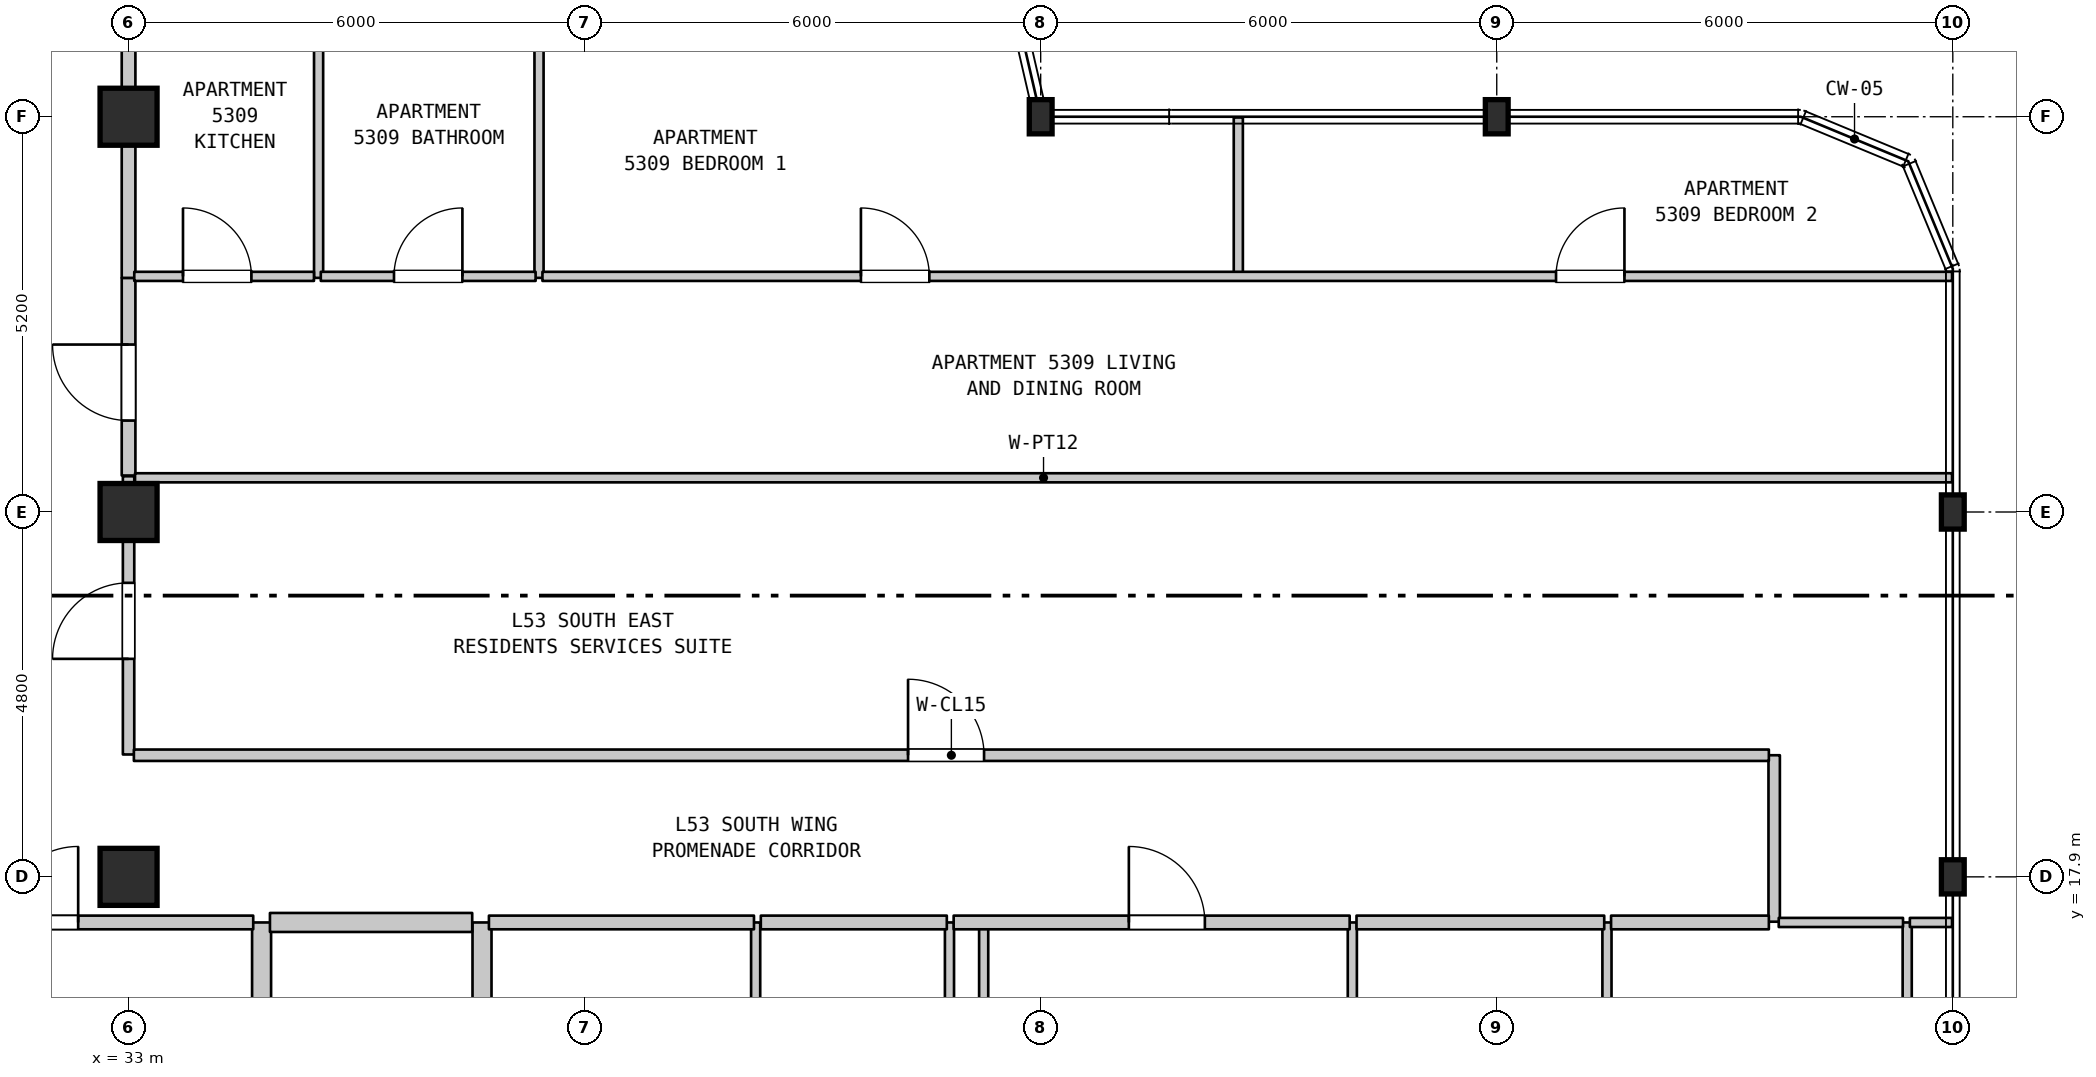
"""IFC4 building model, lengths in metres.
Left out: names, types, materials, properties, quantities, classifications, styles, units other than length and angle.
Written with IfcOpenShell. Run it as: python <this file> out.ifc"""

import sys

from ifc_helpers import new_model, si_unit, direction, frame, frame_2d, origin, origin_2d, place, context, subcontext, project, spatial, rectangle, i_section, extrude, element, fill, save


model = new_model("IFC4")
c1 = context("Model", 3, precision=1e-05, world=origin(), true_north=direction((0.0, 1.0)))
c2 = subcontext(c1, "Body", "Model", "MODEL_VIEW")
j1 = project(units=[si_unit("LENGTHUNIT", "METRE"), si_unit("PLANEANGLEUNIT", "RADIAN")], contexts=[c1])
p1 = place(None, origin())
s1 = spatial("IfcSite", under=j1, at=p1, CompositionType="ELEMENT")
p2 = place(p1, origin())
s2 = spatial("IfcBuilding", under=s1, at=p2, CompositionType="ELEMENT")
p3 = place(p2, frame((0.0, 0.0, 214.3)))
s3 = spatial("IfcBuildingStorey", under=s2, at=p3, CompositionType="ELEMENT", Elevation=214.3)
for number, where, z_axis, x_axis in (
    (1, (33.0, 17.9, 0.0), (0.0, 0.0, 1.0), (1.0, 0.0, 0.0)),
    (2, (33.0, 22.7, 0.0), (0.0, 0.0, 1.0), (1.0, 0.0, 0.0)),
    (3, (33.0, 27.9, 0.0), (0.0, 0.0, 1.0), (1.0, 0.0, 0.0)),
):
    element("IfcColumn", number, at=place(p3, frame(where, z_axis=z_axis, x_axis=x_axis)), inside=s3, PredefinedType="COLUMN", context=c2, shape_type="SweptSolid", body=[
        extrude(rectangle(XDim=0.75, YDim=0.75, at=origin_2d()), origin(), (0.0, 0.0, 1.0), 3.7),
    ])
for number, where, z_axis, x_axis in (
    (4, (45.0, 27.9, 0.0), (0.0, 0.0, 1.0), (1.0, 0.0, 0.0)),
    (5, (51.0, 27.9, 0.0), (0.0, 0.0, 1.0), (1.0, 0.0, 0.0)),
    (6, (57.0, 17.9, 0.0), (0.0, 0.0, 1.0), (1.0, 0.0, 0.0)),
    (7, (57.0, 22.7, 0.0), (0.0, 0.0, 1.0), (1.0, 0.0, 0.0)),
):
    element("IfcColumn", number, at=place(p3, frame(where, z_axis=z_axis, x_axis=x_axis)), inside=s3, PredefinedType="COLUMN", context=c2, shape_type="SweptSolid", body=[
        extrude(i_section(OverallWidth=0.3, OverallDepth=0.45, WebThickness=0.014, FlangeThickness=0.026, FilletRadius=0.027, at=origin_2d()), origin(), (0.0, 0.0, 1.0), 3.7),
    ])
p4 = place(p3, frame((33.0, 19.51, 0.0), z_axis=(0.0, 0.0, 1.0), x_axis=(0.0, 1.0, 0.0)))
e8 = element("IfcWall", 8, at=p4, inside=s3, PredefinedType="STANDARD", context=c2, shape_type="SweptSolid", body=[
    extrude(rectangle(XDim=3.66, YDim=0.15, at=frame_2d((1.83, 0.0))), origin(), (0.0, 0.0, 1.0), 2.98),
])
p5 = place(p4, frame((1.258, 0.0, 0.0)))
e9 = element("IfcOpeningElement", 9, at=p5, cuts=e8, PredefinedType="OPENING", context=c2, shape_type="SweptSolid", body=[
    extrude(rectangle(XDim=1.0, YDim=2.15, at=frame_2d((0.5, 1.075))), frame((0.0, 0.085, 0.0), z_axis=(0.0, -1.0, 0.0), x_axis=(1.0, 0.0, 0.0)), (0.0, 0.0, 1.0), 0.17),
])
p6 = place(p3, frame((33.0, 23.18, 0.0), z_axis=(0.0, 0.0, 1.0), x_axis=(0.0, 1.0, 0.0)))
e10 = element("IfcWall", 10, at=p6, inside=s3, PredefinedType="STANDARD", context=c2, shape_type="SweptSolid", body=[
    extrude(rectangle(XDim=2.6, YDim=0.18, at=frame_2d((1.3, 0.0))), origin(), (0.0, 0.0, 1.0), 2.98),
])
p7 = place(p6, frame((0.723, 0.0, 0.0)))
e11 = element("IfcOpeningElement", 11, at=p7, cuts=e10, PredefinedType="OPENING", context=c2, shape_type="SweptSolid", body=[
    extrude(rectangle(XDim=1.0, YDim=2.15, at=frame_2d((0.5, 1.075))), frame((0.0, 0.1, 0.0), z_axis=(0.0, -1.0, 0.0), x_axis=(1.0, 0.0, 0.0)), (0.0, 0.0, 1.0), 0.2),
])
p8 = place(p3, frame((33.0, 25.78, 0.0), z_axis=(0.0, 0.0, 1.0), x_axis=(0.0, 1.0, 0.0)))
e12 = element("IfcWall", 12, at=p8, inside=s3, PredefinedType="STANDARD", context=c2, shape_type="SweptSolid", body=[
    extrude(rectangle(XDim=2.12, YDim=0.18, at=frame_2d((1.06, 0.0))), origin(), (0.0, 0.0, 1.0), 2.98),
])
p9 = place(p3, frame((34.75, 11.15, 0.0), z_axis=(0.0, 0.0, 1.0), x_axis=(0.0, 1.0, 0.0)))
e13 = element("IfcWall", 13, at=p9, inside=s3, PredefinedType="STANDARD", context=c2, shape_type="SweptSolid", body=[
    extrude(rectangle(XDim=6.15, YDim=0.25, at=frame_2d((3.075, 0.0))), origin(), (0.0, 0.0, 1.0), 3.38),
])
p10 = place(p3, frame((35.5, 25.78, 0.0), z_axis=(0.0, 0.0, 1.0), x_axis=(0.0, 1.0, 0.0)))
e14 = element("IfcWall", 14, at=p10, inside=s3, PredefinedType="PARTITIONING", context=c2, shape_type="SweptSolid", body=[
    extrude(rectangle(XDim=3.38, YDim=0.12, at=frame_2d((1.69, 0.0))), origin(), (0.0, 0.0, 1.0), 3.38),
])
p11 = place(p3, frame((37.65, 11.15, 0.0), z_axis=(0.0, 0.0, 1.0), x_axis=(0.0, 1.0, 0.0)))
e15 = element("IfcWall", 15, at=p11, inside=s3, PredefinedType="STANDARD", context=c2, shape_type="SweptSolid", body=[
    extrude(rectangle(XDim=6.15, YDim=0.25, at=frame_2d((3.075, 0.0))), origin(), (0.0, 0.0, 1.0), 3.38),
])
p12 = place(p3, frame((38.4, 25.78, 0.0), z_axis=(0.0, 0.0, 1.0), x_axis=(0.0, 1.0, 0.0)))
e16 = element("IfcWall", 16, at=p12, inside=s3, PredefinedType="PARTITIONING", context=c2, shape_type="SweptSolid", body=[
    extrude(rectangle(XDim=3.38, YDim=0.12, at=frame_2d((1.69, 0.0))), origin(), (0.0, 0.0, 1.0), 3.38),
])
for number, where, z_axis, x_axis in (
    (17, (41.25, 11.15, 0.0), (0.0, 0.0, 1.0), (0.0, 1.0, 0.0)),
    (18, (43.8, 11.15, 0.0), (0.0, 0.0, 1.0), (0.0, 1.0, 0.0)),
):
    element("IfcWall", number, at=place(p3, frame(where, z_axis=z_axis, x_axis=x_axis)), inside=s3, PredefinedType="PARTITIONING", context=c2, shape_type="SweptSolid", body=[
        extrude(rectangle(XDim=6.15, YDim=0.12, at=frame_2d((3.075, 0.0))), origin(), (0.0, 0.0, 1.0), 3.38),
    ])
p13 = place(p3, frame((44.25, 14.85, 0.0), z_axis=(0.0, 0.0, 1.0), x_axis=(0.0, 1.0, 0.0)))
e19 = element("IfcWall", 19, at=p13, inside=s3, PredefinedType="PARTITIONING", context=c2, shape_type="SweptSolid", body=[
    extrude(rectangle(XDim=2.45, YDim=0.12, at=frame_2d((1.225, 0.0))), origin(), (0.0, 0.0, 1.0), 3.38),
])
p14 = place(p3, frame((47.6, 25.78, 0.0), z_axis=(0.0, 0.0, 1.0), x_axis=(0.0, 1.0, 0.0)))
e20 = element("IfcWall", 20, at=p14, inside=s3, PredefinedType="PARTITIONING", context=c2, shape_type="SweptSolid", body=[
    extrude(rectangle(XDim=2.11, YDim=0.12, at=frame_2d((1.055, 0.0))), origin(), (0.0, 0.0, 1.0), 3.38),
])
for number, where, z_axis, x_axis in (
    (21, (49.1, 11.15, 0.0), (0.0, 0.0, 1.0), (0.0, 1.0, 0.0)),
    (22, (52.45, 11.15, 0.0), (0.0, 0.0, 1.0), (0.0, 1.0, 0.0)),
):
    element("IfcWall", number, at=place(p3, frame(where, z_axis=z_axis, x_axis=x_axis)), inside=s3, PredefinedType="PARTITIONING", context=c2, shape_type="SweptSolid", body=[
        extrude(rectangle(XDim=6.15, YDim=0.12, at=frame_2d((3.075, 0.0))), origin(), (0.0, 0.0, 1.0), 3.38),
    ])
p15 = place(p3, frame((54.65, 17.31, 0.0), z_axis=(0.0, 0.0, 1.0), x_axis=(0.0, 1.0, 0.0)))
e23 = element("IfcWall", 23, at=p15, inside=s3, PredefinedType="STANDARD", context=c2, shape_type="SweptSolid", body=[
    extrude(rectangle(XDim=2.19, YDim=0.15, at=frame_2d((1.095, 0.0))), origin(), (0.0, 0.0, 1.0), 3.38),
])
p16 = place(p3, frame((56.4, 11.15, 0.0), z_axis=(0.0, 0.0, 1.0), x_axis=(0.0, 1.0, 0.0)))
e24 = element("IfcWall", 24, at=p16, inside=s3, PredefinedType="PARTITIONING", context=c2, shape_type="SweptSolid", body=[
    extrude(rectangle(XDim=6.15, YDim=0.12, at=frame_2d((3.075, 0.0))), origin(), (0.0, 0.0, 1.0), 3.38),
])
p17 = place(p3, frame((29.545, 17.3, 0.0), z_axis=(0.0, 0.0, 1.0), x_axis=(1.0, 0.0, 0.0)))
e25 = element("IfcWall", 25, at=p17, inside=s3, PredefinedType="STANDARD", context=c2, shape_type="SweptSolid", body=[
    extrude(rectangle(XDim=5.095, YDim=0.18, at=frame_2d((2.547, 0.0))), origin(), (0.0, 0.0, 1.0), 3.38),
])
p18 = place(p17, frame((1.792, 0.0, 0.0)))
e26 = element("IfcOpeningElement", 26, at=p18, cuts=e25, PredefinedType="OPENING", context=c2, shape_type="SweptSolid", body=[
    extrude(rectangle(XDim=1.0, YDim=2.15, at=frame_2d((0.5, 1.075))), frame((0.0, 0.1, 0.0), z_axis=(0.0, -1.0, 0.0), x_axis=(1.0, 0.0, 0.0)), (0.0, 0.0, 1.0), 0.2),
])
p19 = place(p3, frame((34.86, 17.3, 0.0), z_axis=(0.0, 0.0, 1.0), x_axis=(1.0, 0.0, 0.0)))
e27 = element("IfcWall", 27, at=p19, inside=s3, PredefinedType="STANDARD", context=c2, shape_type="SweptSolid", body=[
    extrude(rectangle(XDim=2.661, YDim=0.25, at=frame_2d((1.331, 0.0))), origin(), (0.0, 0.0, 1.0), 3.38),
])
p20 = place(p3, frame((37.741, 17.3, 0.0), z_axis=(0.0, 0.0, 1.0), x_axis=(1.0, 0.0, 0.0)))
e28 = element("IfcWall", 28, at=p20, inside=s3, PredefinedType="STANDARD", context=c2, shape_type="SweptSolid", body=[
    extrude(rectangle(XDim=3.487, YDim=0.18, at=frame_2d((1.744, 0.0))), origin(), (0.0, 0.0, 1.0), 3.38),
])
p21 = place(p3, frame((41.318, 17.3, 0.0), z_axis=(0.0, 0.0, 1.0), x_axis=(1.0, 0.0, 0.0)))
e29 = element("IfcWall", 29, at=p21, inside=s3, PredefinedType="STANDARD", context=c2, shape_type="SweptSolid", body=[
    extrude(rectangle(XDim=2.447, YDim=0.18, at=frame_2d((1.223, 0.0))), origin(), (0.0, 0.0, 1.0), 3.38),
])
p22 = place(p3, frame((43.855, 17.3, 0.0), z_axis=(0.0, 0.0, 1.0), x_axis=(1.0, 0.0, 0.0)))
e30 = element("IfcWall", 30, at=p22, inside=s3, PredefinedType="STANDARD", context=c2, shape_type="SweptSolid", body=[
    extrude(rectangle(XDim=5.21, YDim=0.18, at=frame_2d((2.605, 0.0))), origin(), (0.0, 0.0, 1.0), 3.38),
])
p23 = place(p22, frame((2.305, 0.0, 0.0)))
e31 = element("IfcOpeningElement", 31, at=p23, cuts=e30, PredefinedType="OPENING", context=c2, shape_type="SweptSolid", body=[
    extrude(rectangle(XDim=1.0, YDim=2.15, at=frame_2d((0.5, 1.075))), frame((0.0, 0.1, 0.0), z_axis=(0.0, -1.0, 0.0), x_axis=(1.0, 0.0, 0.0)), (0.0, 0.0, 1.0), 0.2),
])
p24 = place(p3, frame((49.155, 17.3, 0.0), z_axis=(0.0, 0.0, 1.0), x_axis=(1.0, 0.0, 0.0)))
e32 = element("IfcWall", 32, at=p24, inside=s3, PredefinedType="STANDARD", context=c2, shape_type="SweptSolid", body=[
    extrude(rectangle(XDim=3.259, YDim=0.18, at=frame_2d((1.629, 0.0))), origin(), (0.0, 0.0, 1.0), 3.38),
])
p25 = place(p3, frame((52.504, 17.3, 0.0), z_axis=(0.0, 0.0, 1.0), x_axis=(1.0, 0.0, 0.0)))
e33 = element("IfcWall", 33, at=p25, inside=s3, PredefinedType="STANDARD", context=c2, shape_type="SweptSolid", body=[
    extrude(rectangle(XDim=2.076, YDim=0.18, at=frame_2d((1.038, 0.0))), origin(), (0.0, 0.0, 1.0), 3.38),
])
p26 = place(p3, frame((54.71, 17.3, 0.0), z_axis=(0.0, 0.0, 1.0), x_axis=(1.0, 0.0, 0.0)))
e34 = element("IfcWall", 34, at=p26, inside=s3, PredefinedType="PARTITIONING", context=c2, shape_type="SweptSolid", body=[
    extrude(rectangle(XDim=1.635, YDim=0.12, at=frame_2d((0.817, 0.0))), origin(), (0.0, 0.0, 1.0), 3.38),
])
p27 = place(p3, frame((56.435, 17.3, 0.0), z_axis=(0.0, 0.0, 1.0), x_axis=(1.0, 0.0, 0.0)))
e35 = element("IfcWall", 35, at=p27, inside=s3, PredefinedType="PARTITIONING", context=c2, shape_type="SweptSolid", body=[
    extrude(rectangle(XDim=0.555, YDim=0.12, at=frame_2d((0.277, 0.0))), origin(), (0.0, 0.0, 1.0), 3.38),
])
p28 = place(p3, frame((33.07, 19.5, 0.0), z_axis=(0.0, 0.0, 1.0), x_axis=(1.0, 0.0, 0.0)))
e36 = element("IfcWall", 36, at=p28, inside=s3, PredefinedType="STANDARD", context=c2, shape_type="SweptSolid", body=[
    extrude(rectangle(XDim=21.51, YDim=0.15, at=frame_2d((10.755, 0.0))), origin(), (0.0, 0.0, 1.0), 3.38),
])
p29 = place(p28, frame((10.185, 0.0, 0.0)))
e37 = element("IfcOpeningElement", 37, at=p29, cuts=e36, PredefinedType="OPENING", context=c2, shape_type="SweptSolid", body=[
    extrude(rectangle(XDim=1.0, YDim=2.15, at=frame_2d((0.5, 1.075))), frame((0.0, 0.085, 0.0), z_axis=(0.0, -1.0, 0.0), x_axis=(1.0, 0.0, 0.0)), (0.0, 0.0, 1.0), 0.17),
])
p30 = place(p3, frame((33.085, 23.15, 0.0), z_axis=(0.0, 0.0, 1.0), x_axis=(1.0, 0.0, 0.0)))
e38 = element("IfcWall", 38, at=p30, inside=s3, PredefinedType="PARTITIONING", context=c2, shape_type="SweptSolid", body=[
    extrude(rectangle(XDim=23.905, YDim=0.12, at=frame_2d((11.953, 0.0))), origin(), (0.0, 0.0, 1.0), 3.38),
])
p31 = place(p3, frame((33.075, 25.8, 0.0), z_axis=(0.0, 0.0, 1.0), x_axis=(1.0, 0.0, 0.0)))
e39 = element("IfcWall", 39, at=p31, inside=s3, PredefinedType="PARTITIONING", context=c2, shape_type="SweptSolid", body=[
    extrude(rectangle(XDim=2.364, YDim=0.12, at=frame_2d((1.182, 0.0))), origin(), (0.0, 0.0, 1.0), 3.38),
])
p32 = place(p31, frame((0.641, 0.0, 0.0)))
e40 = element("IfcOpeningElement", 40, at=p32, cuts=e39, PredefinedType="OPENING", context=c2, shape_type="SweptSolid", body=[
    extrude(rectangle(XDim=0.9, YDim=2.15, at=frame_2d((0.45, 1.075))), frame((0.0, 0.07, 0.0), z_axis=(0.0, -1.0, 0.0), x_axis=(1.0, 0.0, 0.0)), (0.0, 0.0, 1.0), 0.14),
])
p33 = place(p3, frame((35.529, 25.8, 0.0), z_axis=(0.0, 0.0, 1.0), x_axis=(1.0, 0.0, 0.0)))
e41 = element("IfcWall", 41, at=p33, inside=s3, PredefinedType="PARTITIONING", context=c2, shape_type="SweptSolid", body=[
    extrude(rectangle(XDim=2.826, YDim=0.12, at=frame_2d((1.413, 0.0))), origin(), (0.0, 0.0, 1.0), 3.38),
])
p34 = place(p33, frame((0.963, 0.0, 0.0)))
e42 = element("IfcOpeningElement", 42, at=p34, cuts=e41, PredefinedType="OPENING", context=c2, shape_type="SweptSolid", body=[
    extrude(rectangle(XDim=0.9, YDim=2.1, at=frame_2d((0.45, 1.05))), frame((0.0, 0.07, 0.0), z_axis=(0.0, -1.0, 0.0), x_axis=(1.0, 0.0, 0.0)), (0.0, 0.0, 1.0), 0.14),
])
p35 = place(p3, frame((38.445, 25.8, 0.0), z_axis=(0.0, 0.0, 1.0), x_axis=(1.0, 0.0, 0.0)))
e43 = element("IfcWall", 43, at=p35, inside=s3, PredefinedType="PARTITIONING", context=c2, shape_type="SweptSolid", body=[
    extrude(rectangle(XDim=18.545, YDim=0.12, at=frame_2d((9.272, 0.0))), origin(), (0.0, 0.0, 1.0), 3.38),
])
p36 = place(p35, frame((4.19, 0.0, 0.0)))
e44 = element("IfcOpeningElement", 44, at=p36, cuts=e43, PredefinedType="OPENING", context=c2, shape_type="SweptSolid", body=[
    extrude(rectangle(XDim=0.9, YDim=2.15, at=frame_2d((0.45, 1.075))), frame((0.0, 0.07, 0.0), z_axis=(0.0, -1.0, 0.0), x_axis=(1.0, 0.0, 0.0)), (0.0, 0.0, 1.0), 0.14),
])
p37 = place(p35, frame((13.335, 0.0, 0.0)))
e45 = element("IfcOpeningElement", 45, at=p37, cuts=e43, PredefinedType="OPENING", context=c2, shape_type="SweptSolid", body=[
    extrude(rectangle(XDim=0.9, YDim=2.15, at=frame_2d((0.45, 1.075))), frame((0.0, 0.07, 0.0), z_axis=(0.0, -1.0, 0.0), x_axis=(1.0, 0.0, 0.0)), (0.0, 0.0, 1.0), 0.14),
])
p38 = place(p3, frame((33.0, 27.9, 0.0), z_axis=(0.0, 0.0, 1.0), x_axis=(0.0, 1.0, 0.0)))
e46 = element("IfcWall", 46, at=p38, inside=s3, PredefinedType="STANDARD", context=c2, shape_type="SweptSolid", body=[
    extrude(rectangle(XDim=1.26, YDim=0.18, at=frame_2d((0.63, 0.0))), origin(), (0.0, 0.0, 1.0), 2.88),
])
p39 = place(p5, origin())
e47 = element("IfcDoor", 47, at=p39, inside=s3, OperationType="SINGLE_SWING_LEFT", PredefinedType="DOOR", context=c2, shape_type="SweptSolid", body=[
    extrude(rectangle(XDim=1.0, YDim=2.15, at=frame_2d((0.5, 1.075))), frame((0.0, 0.025, 0.0), z_axis=(0.0, -1.0, 0.0), x_axis=(1.0, 0.0, 0.0)), (0.0, 0.0, 1.0), 0.05),
])
fill(e9, e47)
p40 = place(p7, origin())
e48 = element("IfcDoor", 48, at=p40, inside=s3, OperationType="SINGLE_SWING_RIGHT", PredefinedType="DOOR", context=c2, shape_type="SweptSolid", body=[
    extrude(rectangle(XDim=1.0, YDim=2.15, at=frame_2d((0.5, 1.075))), frame((0.0, 0.025, 0.0), z_axis=(0.0, -1.0, 0.0), x_axis=(1.0, 0.0, 0.0)), (0.0, 0.0, 1.0), 0.05),
])
fill(e11, e48)
p41 = place(p18, origin())
e49 = element("IfcDoor", 49, at=p41, inside=s3, OperationType="SINGLE_SWING_RIGHT", PredefinedType="DOOR", context=c2, shape_type="SweptSolid", body=[
    extrude(rectangle(XDim=1.0, YDim=2.15, at=frame_2d((0.5, 1.075))), frame((0.0, 0.025, 0.0), z_axis=(0.0, -1.0, 0.0), x_axis=(1.0, 0.0, 0.0)), (0.0, 0.0, 1.0), 0.05),
])
fill(e26, e49)
p42 = place(p23, origin())
e50 = element("IfcDoor", 50, at=p42, inside=s3, OperationType="SINGLE_SWING_LEFT", PredefinedType="DOOR", context=c2, shape_type="SweptSolid", body=[
    extrude(rectangle(XDim=1.0, YDim=2.15, at=frame_2d((0.5, 1.075))), frame((0.0, 0.025, 0.0), z_axis=(0.0, -1.0, 0.0), x_axis=(1.0, 0.0, 0.0)), (0.0, 0.0, 1.0), 0.05),
])
fill(e31, e50)
p43 = place(p29, origin())
e51 = element("IfcDoor", 51, at=p43, inside=s3, OperationType="SINGLE_SWING_LEFT", PredefinedType="DOOR", context=c2, shape_type="SweptSolid", body=[
    extrude(rectangle(XDim=1.0, YDim=2.15, at=frame_2d((0.5, 1.075))), frame((0.0, 0.025, 0.0), z_axis=(0.0, -1.0, 0.0), x_axis=(1.0, 0.0, 0.0)), (0.0, 0.0, 1.0), 0.05),
])
fill(e37, e51)
p44 = place(p32, origin())
e52 = element("IfcDoor", 52, at=p44, inside=s3, OperationType="SINGLE_SWING_LEFT", PredefinedType="DOOR", context=c2, shape_type="SweptSolid", body=[
    extrude(rectangle(XDim=0.9, YDim=2.15, at=frame_2d((0.45, 1.075))), frame((0.0, 0.025, 0.0), z_axis=(0.0, -1.0, 0.0), x_axis=(1.0, 0.0, 0.0)), (0.0, 0.0, 1.0), 0.05),
])
fill(e40, e52)
p45 = place(p34, origin())
e53 = element("IfcDoor", 53, at=p45, inside=s3, OperationType="SINGLE_SWING_RIGHT", PredefinedType="DOOR", context=c2, shape_type="SweptSolid", body=[
    extrude(rectangle(XDim=0.9, YDim=2.1, at=frame_2d((0.45, 1.05))), frame((0.0, 0.025, 0.0), z_axis=(0.0, -1.0, 0.0), x_axis=(1.0, 0.0, 0.0)), (0.0, 0.0, 1.0), 0.05),
])
fill(e42, e53)
p46 = place(p36, origin())
e54 = element("IfcDoor", 54, at=p46, inside=s3, OperationType="SINGLE_SWING_LEFT", PredefinedType="DOOR", context=c2, shape_type="SweptSolid", body=[
    extrude(rectangle(XDim=0.9, YDim=2.15, at=frame_2d((0.45, 1.075))), frame((0.0, 0.025, 0.0), z_axis=(0.0, -1.0, 0.0), x_axis=(1.0, 0.0, 0.0)), (0.0, 0.0, 1.0), 0.05),
])
fill(e44, e54)
p47 = place(p37, origin())
e55 = element("IfcDoor", 55, at=p47, inside=s3, OperationType="SINGLE_SWING_RIGHT", PredefinedType="DOOR", context=c2, shape_type="SweptSolid", body=[
    extrude(rectangle(XDim=0.9, YDim=2.15, at=frame_2d((0.45, 1.075))), frame((0.0, 0.025, 0.0), z_axis=(0.0, -1.0, 0.0), x_axis=(1.0, 0.0, 0.0)), (0.0, 0.0, 1.0), 0.05),
])
fill(e45, e55)
save(model, sys.argv[1])
